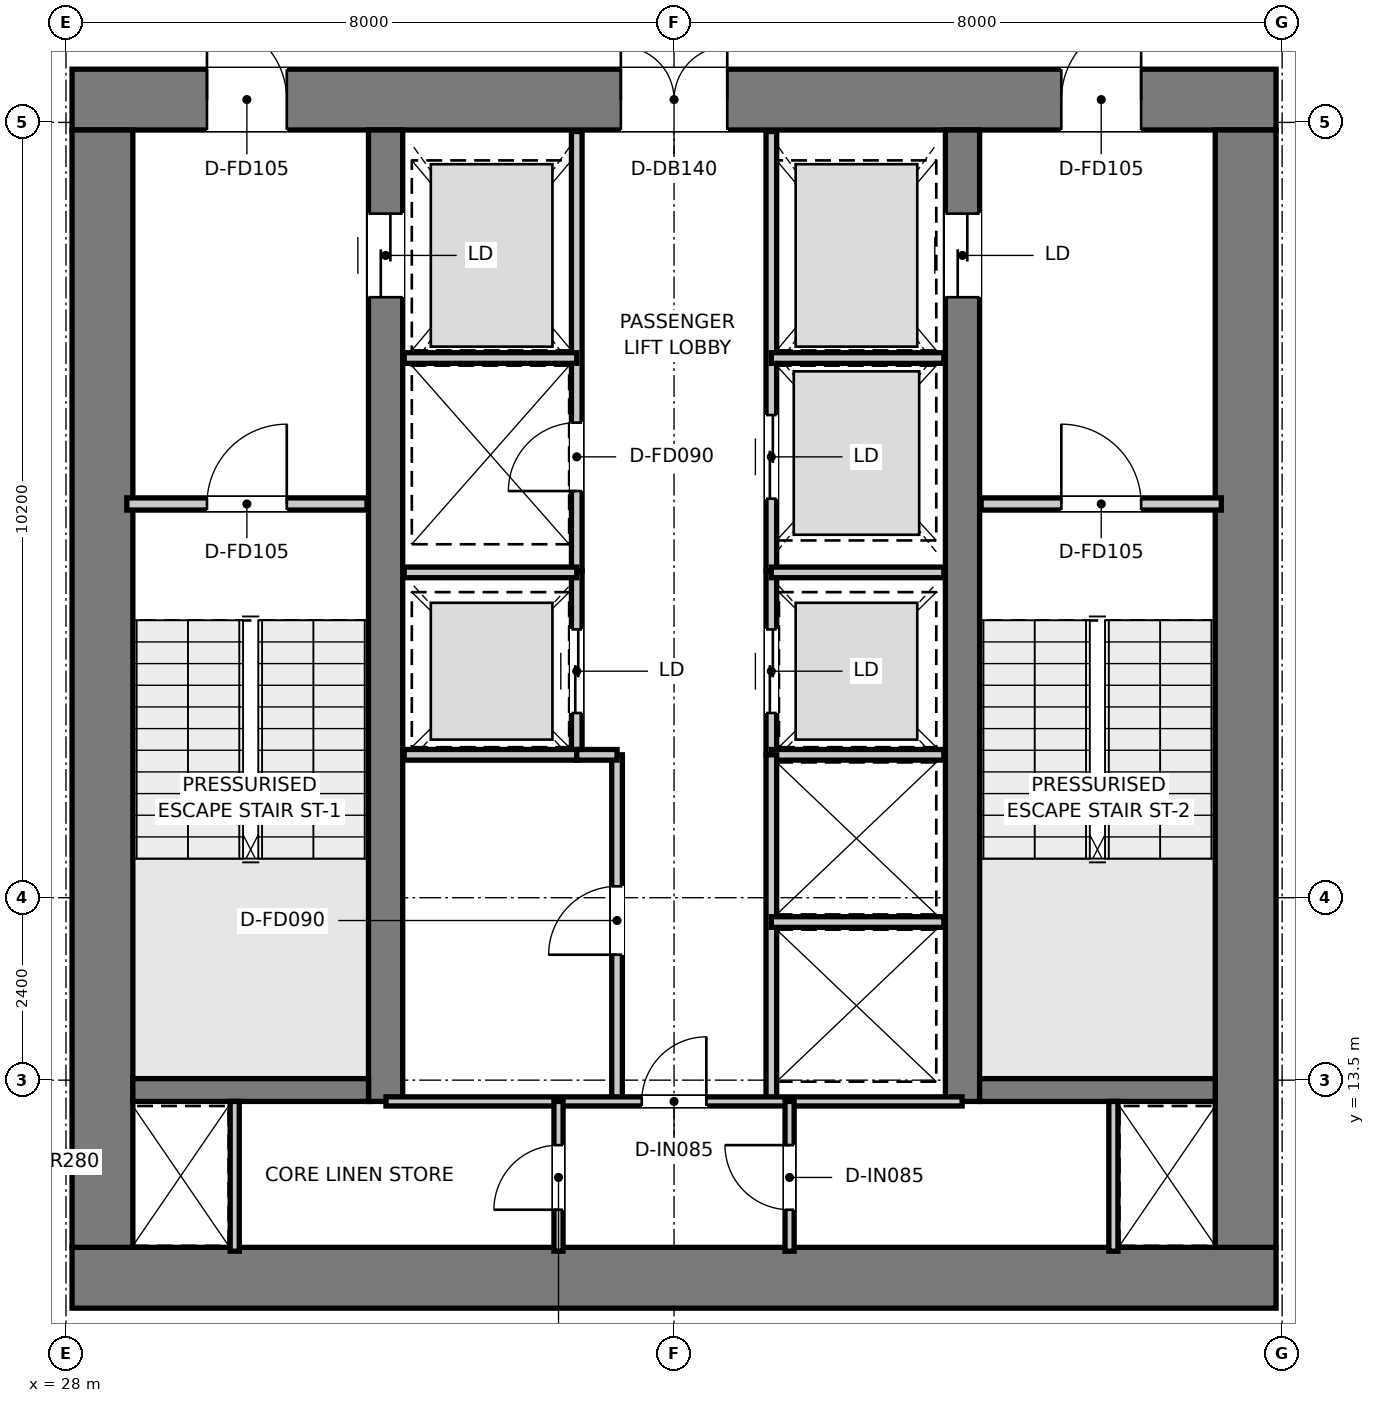
"""IFC4 building model, lengths in metres.
Left out: names, types, materials, properties, quantities, classifications, styles, units other than length and angle.
Written with IfcOpenShell. Run it as: python <this file> out.ifc"""

import sys

from ifc_helpers import new_model, si_unit, direction, frame, frame_2d, origin, place, context, subcontext, project, spatial, rectangle, extrude, element, fill, save


model = new_model("IFC4")
c1 = context("Model", 3, precision=1e-05, world=origin(), true_north=direction((0.0, 1.0)))
c2 = subcontext(c1, "Body", "Model", "MODEL_VIEW")
j1 = project(units=[si_unit("LENGTHUNIT", "METRE"), si_unit("PLANEANGLEUNIT", "RADIAN")], contexts=[c1])
p1 = place(None, origin())
s1 = spatial("IfcSite", under=j1, at=p1, CompositionType="ELEMENT")
p2 = place(p1, origin())
s2 = spatial("IfcBuilding", under=s1, at=p2, CompositionType="ELEMENT")
p3 = place(p2, frame((0.0, 0.0, 267.4)))
s3 = spatial("IfcBuildingStorey", under=s2, at=p3, CompositionType="ELEMENT", Elevation=267.4)
p4 = place(p3, frame((28.08, 10.9, 0.0), z_axis=(0.0, 0.0, 1.0), x_axis=(1.0, 0.0, 0.0)))
e1 = element("IfcWall", 1, at=p4, inside=s3, PredefinedType="SHEAR", context=c2, shape_type="SweptSolid", body=[
    extrude(rectangle(XDim=15.84, YDim=0.8, at=frame_2d((7.92, 0.0))), origin(), (0.0, 0.0, 1.0), 3.95),
])
p5 = place(p3, frame((28.08, 26.4, 0.0), z_axis=(0.0, 0.0, 1.0), x_axis=(1.0, 0.0, 0.0)))
e2 = element("IfcWall", 2, at=p5, inside=s3, PredefinedType="SHEAR", context=c2, shape_type="SweptSolid", body=[
    extrude(rectangle(XDim=15.84, YDim=0.8, at=frame_2d((7.92, 0.0))), origin(), (0.0, 0.0, 1.0), 3.95),
])
p6 = place(p5, frame((7.22, 0.0, 0.0)))
e3 = element("IfcOpeningElement", 3, at=p6, cuts=e2, PredefinedType="OPENING", context=c2, shape_type="SweptSolid", body=[
    extrude(rectangle(XDim=1.4, YDim=2.2, at=frame_2d((0.7, 1.1))), frame((0.0, 0.41, 0.0), z_axis=(0.0, -1.0, 0.0), x_axis=(1.0, 0.0, 0.0)), (0.0, 0.0, 1.0), 0.82),
])
p7 = place(p5, frame((1.775, 0.0, 0.0)))
e4 = element("IfcOpeningElement", 4, at=p7, cuts=e2, PredefinedType="OPENING", context=c2, shape_type="SweptSolid", body=[
    extrude(rectangle(XDim=1.05, YDim=2.1, at=frame_2d((0.525, 1.05))), frame((0.0, 0.41, 0.0), z_axis=(0.0, -1.0, 0.0), x_axis=(1.0, 0.0, 0.0)), (0.0, 0.0, 1.0), 0.82),
])
p8 = place(p5, frame((13.015, 0.0, 0.0)))
e5 = element("IfcOpeningElement", 5, at=p8, cuts=e2, PredefinedType="OPENING", context=c2, shape_type="SweptSolid", body=[
    extrude(rectangle(XDim=1.05, YDim=2.1, at=frame_2d((0.525, 1.05))), frame((0.0, 0.41, 0.0), z_axis=(0.0, -1.0, 0.0), x_axis=(1.0, 0.0, 0.0)), (0.0, 0.0, 1.0), 0.82),
])
for number, where, z_axis, x_axis in (
    (6, (28.48, 11.3, 0.0), (0.0, 0.0, 1.0), (0.0, 1.0, 0.0)),
    (7, (43.52, 11.3, 0.0), (0.0, 0.0, 1.0), (0.0, 1.0, 0.0)),
):
    element("IfcWall", number, at=place(p3, frame(where, z_axis=z_axis, x_axis=x_axis)), inside=s3, PredefinedType="SHEAR", context=c2, shape_type="SweptSolid", body=[
        extrude(rectangle(XDim=14.7, YDim=0.8, at=frame_2d((7.35, 0.0))), origin(), (0.0, 0.0, 1.0), 3.95),
    ])
p9 = place(p3, frame((32.205, 13.22, 0.0), z_axis=(0.0, 0.0, 1.0), x_axis=(0.0, 1.0, 0.0)))
e8 = element("IfcWall", 8, at=p9, inside=s3, PredefinedType="SHEAR", context=c2, shape_type="SweptSolid", body=[
    extrude(rectangle(XDim=12.78, YDim=0.45, at=frame_2d((6.39, 0.0))), origin(), (0.0, 0.0, 1.0), 3.95),
])
p10 = place(p9, frame((10.58, 0.0, 0.0)))
e9 = element("IfcOpeningElement", 9, at=p10, cuts=e8, PredefinedType="OPENING", context=c2, shape_type="SweptSolid", body=[
    extrude(rectangle(XDim=1.1, YDim=2.15, at=frame_2d((0.55, 1.075))), frame((0.0, 0.235, 0.0), z_axis=(0.0, -1.0, 0.0), x_axis=(1.0, 0.0, 0.0)), (0.0, 0.0, 1.0), 0.47),
])
p11 = place(p3, frame((39.795, 13.22, 0.0), z_axis=(0.0, 0.0, 1.0), x_axis=(0.0, 1.0, 0.0)))
e10 = element("IfcWall", 10, at=p11, inside=s3, PredefinedType="SHEAR", context=c2, shape_type="SweptSolid", body=[
    extrude(rectangle(XDim=12.78, YDim=0.45, at=frame_2d((6.39, 0.0))), origin(), (0.0, 0.0, 1.0), 3.95),
])
p12 = place(p11, frame((10.58, 0.0, 0.0)))
e11 = element("IfcOpeningElement", 11, at=p12, cuts=e10, PredefinedType="OPENING", context=c2, shape_type="SweptSolid", body=[
    extrude(rectangle(XDim=1.1, YDim=2.15, at=frame_2d((0.55, 1.075))), frame((0.0, 0.235, 0.0), z_axis=(0.0, -1.0, 0.0), x_axis=(1.0, 0.0, 0.0)), (0.0, 0.0, 1.0), 0.47),
])
for number, where, z_axis, x_axis in (
    (12, (28.88, 13.37, 0.0), (0.0, 0.0, 1.0), (1.0, 0.0, 0.0)),
    (13, (40.02, 13.37, 0.0), (0.0, 0.0, 1.0), (1.0, 0.0, 0.0)),
):
    element("IfcWall", number, at=place(p3, frame(where, z_axis=z_axis, x_axis=x_axis)), inside=s3, PredefinedType="SHEAR", context=c2, shape_type="SweptSolid", body=[
        extrude(rectangle(XDim=3.1, YDim=0.3, at=frame_2d((1.55, 0.0))), origin(), (0.0, 0.0, 1.0), 3.95),
    ])
p13 = place(p3, frame((28.8, 21.08, 0.0), z_axis=(0.0, 0.0, 1.0), x_axis=(1.0, 0.0, 0.0)))
e14 = element("IfcWall", 14, at=p13, inside=s3, PredefinedType="PARTITIONING", context=c2, shape_type="SweptSolid", body=[
    extrude(rectangle(XDim=3.16, YDim=0.16, at=frame_2d((1.58, 0.0))), origin(), (0.0, 0.0, 1.0), 3.67),
])
p14 = place(p13, frame((1.055, 0.0, 0.0)))
e15 = element("IfcOpeningElement", 15, at=p14, cuts=e14, PredefinedType="OPENING", context=c2, shape_type="SweptSolid", body=[
    extrude(rectangle(XDim=1.05, YDim=2.1, at=frame_2d((0.525, 1.05))), frame((0.0, 0.09, 0.0), z_axis=(0.0, -1.0, 0.0), x_axis=(1.0, 0.0, 0.0)), (0.0, 0.0, 1.0), 0.18),
])
p15 = place(p3, frame((40.04, 21.08, 0.0), z_axis=(0.0, 0.0, 1.0), x_axis=(1.0, 0.0, 0.0)))
e16 = element("IfcWall", 16, at=p15, inside=s3, PredefinedType="PARTITIONING", context=c2, shape_type="SweptSolid", body=[
    extrude(rectangle(XDim=3.16, YDim=0.16, at=frame_2d((1.58, 0.0))), origin(), (0.0, 0.0, 1.0), 3.67),
])
p16 = place(p15, frame((1.055, 0.0, 0.0)))
e17 = element("IfcOpeningElement", 17, at=p16, cuts=e16, PredefinedType="OPENING", context=c2, shape_type="SweptSolid", body=[
    extrude(rectangle(XDim=1.05, YDim=2.1, at=frame_2d((0.525, 1.05))), frame((0.0, 0.09, 0.0), z_axis=(0.0, -1.0, 0.0), x_axis=(1.0, 0.0, 0.0)), (0.0, 0.0, 1.0), 0.18),
])
p17 = place(p3, frame((34.72, 20.2, 0.0), z_axis=(0.0, 0.0, 1.0), x_axis=(0.0, 1.0, 0.0)))
e18 = element("IfcWall", 18, at=p17, inside=s3, PredefinedType="PARTITIONING", context=c2, shape_type="SweptSolid", body=[
    extrude(rectangle(XDim=5.78, YDim=0.14, at=frame_2d((2.89, 0.0))), origin(), (0.0, 0.0, 1.0), 2.82),
])
p18 = place(p17, frame((1.05, 0.0, 0.0)))
e19 = element("IfcOpeningElement", 19, at=p18, cuts=e18, PredefinedType="OPENING", context=c2, shape_type="SweptSolid", body=[
    extrude(rectangle(XDim=0.9, YDim=2.1, at=frame_2d((0.45, 1.05))), frame((0.0, 0.08, 0.0), z_axis=(0.0, -1.0, 0.0), x_axis=(1.0, 0.0, 0.0)), (0.0, 0.0, 1.0), 0.16),
])
p19 = place(p3, frame((37.28, 20.2, 0.0), z_axis=(0.0, 0.0, 1.0), x_axis=(0.0, 1.0, 0.0)))
e20 = element("IfcWall", 20, at=p19, inside=s3, PredefinedType="PARTITIONING", context=c2, shape_type="SweptSolid", body=[
    extrude(rectangle(XDim=5.78, YDim=0.14, at=frame_2d((2.89, 0.0))), origin(), (0.0, 0.0, 1.0), 2.82),
])
p20 = place(p19, frame((0.95, 0.0, 0.0)))
e21 = element("IfcOpeningElement", 21, at=p20, cuts=e20, PredefinedType="OPENING", context=c2, shape_type="SweptSolid", body=[
    extrude(rectangle(XDim=1.1, YDim=2.15, at=frame_2d((0.55, 1.075))), frame((0.0, 0.08, 0.0), z_axis=(0.0, -1.0, 0.0), x_axis=(1.0, 0.0, 0.0)), (0.0, 0.0, 1.0), 0.16),
])
for number, where, z_axis, x_axis in (
    (22, (32.45, 23.0, 0.0), (0.0, 0.0, 1.0), (1.0, 0.0, 0.0)),
    (23, (37.28, 23.0, 0.0), (0.0, 0.0, 1.0), (1.0, 0.0, 0.0)),
):
    element("IfcWall", number, at=place(p3, frame(where, z_axis=z_axis, x_axis=x_axis)), inside=s3, PredefinedType="PARTITIONING", context=c2, shape_type="SweptSolid", body=[
        extrude(rectangle(XDim=2.27, YDim=0.14, at=frame_2d((1.135, 0.0))), origin(), (0.0, 0.0, 1.0), 2.82),
    ])
p21 = place(p3, frame((34.72, 17.78, 0.0), z_axis=(0.0, 0.0, 1.0), x_axis=(0.0, 1.0, 0.0)))
e24 = element("IfcWall", 24, at=p21, inside=s3, PredefinedType="PARTITIONING", context=c2, shape_type="SweptSolid", body=[
    extrude(rectangle(XDim=2.42, YDim=0.14, at=frame_2d((1.21, 0.0))), origin(), (0.0, 0.0, 1.0), 3.67),
])
p22 = place(p21, frame((0.55, 0.0, 0.0)))
e25 = element("IfcOpeningElement", 25, at=p22, cuts=e24, PredefinedType="OPENING", context=c2, shape_type="SweptSolid", body=[
    extrude(rectangle(XDim=1.1, YDim=2.15, at=frame_2d((0.55, 1.075))), frame((0.0, 0.08, 0.0), z_axis=(0.0, -1.0, 0.0), x_axis=(1.0, 0.0, 0.0)), (0.0, 0.0, 1.0), 0.16),
])
p23 = place(p3, frame((37.28, 17.78, 0.0), z_axis=(0.0, 0.0, 1.0), x_axis=(0.0, 1.0, 0.0)))
e26 = element("IfcWall", 26, at=p23, inside=s3, PredefinedType="PARTITIONING", context=c2, shape_type="SweptSolid", body=[
    extrude(rectangle(XDim=2.42, YDim=0.14, at=frame_2d((1.21, 0.0))), origin(), (0.0, 0.0, 1.0), 3.67),
])
p24 = place(p23, frame((0.55, 0.0, 0.0)))
e27 = element("IfcOpeningElement", 27, at=p24, cuts=e26, PredefinedType="OPENING", context=c2, shape_type="SweptSolid", body=[
    extrude(rectangle(XDim=1.1, YDim=2.15, at=frame_2d((0.55, 1.075))), frame((0.0, 0.08, 0.0), z_axis=(0.0, -1.0, 0.0), x_axis=(1.0, 0.0, 0.0)), (0.0, 0.0, 1.0), 0.16),
])
for number, where, z_axis, x_axis in (
    (28, (32.45, 17.78, 0.0), (0.0, 0.0, 1.0), (1.0, 0.0, 0.0)),
    (29, (32.45, 20.18, 0.0), (0.0, 0.0, 1.0), (1.0, 0.0, 0.0)),
    (30, (37.28, 17.78, 0.0), (0.0, 0.0, 1.0), (1.0, 0.0, 0.0)),
    (31, (37.28, 20.18, 0.0), (0.0, 0.0, 1.0), (1.0, 0.0, 0.0)),
):
    element("IfcWall", number, at=place(p3, frame(where, z_axis=z_axis, x_axis=x_axis)), inside=s3, PredefinedType="PARTITIONING", context=c2, shape_type="SweptSolid", body=[
        extrude(rectangle(XDim=2.27, YDim=0.14, at=frame_2d((1.135, 0.0))), origin(), (0.0, 0.0, 1.0), 3.67),
    ])
p25 = place(p3, frame((35.25, 13.22, 0.0), z_axis=(0.0, 0.0, 1.0), x_axis=(0.0, 1.0, 0.0)))
e32 = element("IfcWall", 32, at=p25, inside=s3, PredefinedType="PARTITIONING", context=c2, shape_type="SweptSolid", body=[
    extrude(rectangle(XDim=4.56, YDim=0.14, at=frame_2d((2.28, 0.0))), origin(), (0.0, 0.0, 1.0), 3.67),
])
p26 = place(p25, frame((1.93, 0.0, 0.0)))
e33 = element("IfcOpeningElement", 33, at=p26, cuts=e32, PredefinedType="OPENING", context=c2, shape_type="SweptSolid", body=[
    extrude(rectangle(XDim=0.9, YDim=2.1, at=frame_2d((0.45, 1.05))), frame((0.0, 0.08, 0.0), z_axis=(0.0, -1.0, 0.0), x_axis=(1.0, 0.0, 0.0)), (0.0, 0.0, 1.0), 0.16),
])
p27 = place(p3, frame((34.72, 17.78, 0.0), z_axis=(0.0, 0.0, 1.0), x_axis=(1.0, 0.0, 0.0)))
e34 = element("IfcWall", 34, at=p27, inside=s3, PredefinedType="PARTITIONING", context=c2, shape_type="SweptSolid", body=[
    extrude(rectangle(XDim=0.53, YDim=0.14, at=frame_2d((0.265, 0.0))), origin(), (0.0, 0.0, 1.0), 3.67),
])
p28 = place(p3, frame((37.28, 13.22, 0.0), z_axis=(0.0, 0.0, 1.0), x_axis=(0.0, 1.0, 0.0)))
e35 = element("IfcWall", 35, at=p28, inside=s3, PredefinedType="PARTITIONING", context=c2, shape_type="SweptSolid", body=[
    extrude(rectangle(XDim=4.56, YDim=0.14, at=frame_2d((2.28, 0.0))), origin(), (0.0, 0.0, 1.0), 3.67),
])
p29 = place(p3, frame((37.28, 15.58, 0.0), z_axis=(0.0, 0.0, 1.0), x_axis=(1.0, 0.0, 0.0)))
e36 = element("IfcWall", 36, at=p29, inside=s3, PredefinedType="PARTITIONING", context=c2, shape_type="SweptSolid", body=[
    extrude(rectangle(XDim=2.27, YDim=0.14, at=frame_2d((1.135, 0.0))), origin(), (0.0, 0.0, 1.0), 3.67),
])
for number, where, z_axis, x_axis in (
    (37, (30.22, 11.25, 0.0), (0.0, 0.0, 1.0), (0.0, 1.0, 0.0)),
    (38, (41.78, 11.25, 0.0), (0.0, 0.0, 1.0), (0.0, 1.0, 0.0)),
):
    element("IfcWall", number, at=place(p3, frame(where, z_axis=z_axis, x_axis=x_axis)), inside=s3, PredefinedType="PARTITIONING", context=c2, shape_type="SweptSolid", body=[
        extrude(rectangle(XDim=1.97, YDim=0.12, at=frame_2d((0.985, 0.0))), origin(), (0.0, 0.0, 1.0), 3.67),
    ])
p30 = place(p3, frame((32.21, 13.22, 0.0), z_axis=(0.0, 0.0, 1.0), x_axis=(1.0, 0.0, 0.0)))
e39 = element("IfcWall", 39, at=p30, inside=s3, PredefinedType="PARTITIONING", context=c2, shape_type="SweptSolid", body=[
    extrude(rectangle(XDim=7.58, YDim=0.12, at=frame_2d((3.79, 0.0))), origin(), (0.0, 0.0, 1.0), 3.67),
])
p31 = place(p30, frame((3.365, 0.0, 0.0)))
e40 = element("IfcOpeningElement", 40, at=p31, cuts=e39, PredefinedType="OPENING", context=c2, shape_type="SweptSolid", body=[
    extrude(rectangle(XDim=0.85, YDim=2.1, at=frame_2d((0.425, 1.05))), frame((0.0, 0.07, 0.0), z_axis=(0.0, -1.0, 0.0), x_axis=(1.0, 0.0, 0.0)), (0.0, 0.0, 1.0), 0.14),
])
p32 = place(p3, frame((34.48, 11.25, 0.0), z_axis=(0.0, 0.0, 1.0), x_axis=(0.0, 1.0, 0.0)))
e41 = element("IfcWall", 41, at=p32, inside=s3, PredefinedType="PARTITIONING", context=c2, shape_type="SweptSolid", body=[
    extrude(rectangle(XDim=1.97, YDim=0.12, at=frame_2d((0.985, 0.0))), origin(), (0.0, 0.0, 1.0), 3.67),
])
p33 = place(p32, frame((0.545, 0.0, 0.0)))
e42 = element("IfcOpeningElement", 42, at=p33, cuts=e41, PredefinedType="OPENING", context=c2, shape_type="SweptSolid", body=[
    extrude(rectangle(XDim=0.85, YDim=2.1, at=frame_2d((0.425, 1.05))), frame((0.0, 0.07, 0.0), z_axis=(0.0, -1.0, 0.0), x_axis=(1.0, 0.0, 0.0)), (0.0, 0.0, 1.0), 0.14),
])
p34 = place(p3, frame((37.52, 11.25, 0.0), z_axis=(0.0, 0.0, 1.0), x_axis=(0.0, 1.0, 0.0)))
e43 = element("IfcWall", 43, at=p34, inside=s3, PredefinedType="PARTITIONING", context=c2, shape_type="SweptSolid", body=[
    extrude(rectangle(XDim=1.97, YDim=0.12, at=frame_2d((0.985, 0.0))), origin(), (0.0, 0.0, 1.0), 3.67),
])
p35 = place(p34, frame((0.545, 0.0, 0.0)))
e44 = element("IfcOpeningElement", 44, at=p35, cuts=e43, PredefinedType="OPENING", context=c2, shape_type="SweptSolid", body=[
    extrude(rectangle(XDim=0.85, YDim=2.1, at=frame_2d((0.425, 1.05))), frame((0.0, 0.07, 0.0), z_axis=(0.0, -1.0, 0.0), x_axis=(1.0, 0.0, 0.0)), (0.0, 0.0, 1.0), 0.14),
])
p36 = place(p14, origin())
e45 = element("IfcDoor", 45, at=p36, inside=s3, OperationType="SINGLE_SWING_RIGHT", PredefinedType="DOOR", context=c2, shape_type="SweptSolid", body=[
    extrude(rectangle(XDim=1.05, YDim=2.1, at=frame_2d((0.525, 1.05))), frame((0.0, 0.025, 0.0), z_axis=(0.0, -1.0, 0.0), x_axis=(1.0, 0.0, 0.0)), (0.0, 0.0, 1.0), 0.05),
])
fill(e15, e45)
p37 = place(p16, origin())
e46 = element("IfcDoor", 46, at=p37, inside=s3, OperationType="SINGLE_SWING_LEFT", PredefinedType="DOOR", context=c2, shape_type="SweptSolid", body=[
    extrude(rectangle(XDim=1.05, YDim=2.1, at=frame_2d((0.525, 1.05))), frame((0.0, 0.025, 0.0), z_axis=(0.0, -1.0, 0.0), x_axis=(1.0, 0.0, 0.0)), (0.0, 0.0, 1.0), 0.05),
])
fill(e17, e46)
p38 = place(p6, origin())
e47 = element("IfcDoor", 47, at=p38, inside=s3, OperationType="DOUBLE_DOOR_SINGLE_SWING", PredefinedType="DOOR", context=c2, shape_type="SweptSolid", body=[
    extrude(rectangle(XDim=1.4, YDim=2.2, at=frame_2d((0.7, 1.1))), frame((0.0, 0.025, 0.0), z_axis=(0.0, -1.0, 0.0), x_axis=(1.0, 0.0, 0.0)), (0.0, 0.0, 1.0), 0.05),
])
fill(e3, e47)
p39 = place(p7, origin())
e48 = element("IfcDoor", 48, at=p39, inside=s3, OperationType="SINGLE_SWING_LEFT", PredefinedType="DOOR", context=c2, shape_type="SweptSolid", body=[
    extrude(rectangle(XDim=1.05, YDim=2.1, at=frame_2d((0.525, 1.05))), frame((0.0, 0.025, 0.0), z_axis=(0.0, -1.0, 0.0), x_axis=(1.0, 0.0, 0.0)), (0.0, 0.0, 1.0), 0.05),
])
fill(e4, e48)
p40 = place(p8, origin())
e49 = element("IfcDoor", 49, at=p40, inside=s3, OperationType="SINGLE_SWING_RIGHT", PredefinedType="DOOR", context=c2, shape_type="SweptSolid", body=[
    extrude(rectangle(XDim=1.05, YDim=2.1, at=frame_2d((0.525, 1.05))), frame((0.0, 0.025, 0.0), z_axis=(0.0, -1.0, 0.0), x_axis=(1.0, 0.0, 0.0)), (0.0, 0.0, 1.0), 0.05),
])
fill(e5, e49)
p41 = place(p10, origin())
e50 = element("IfcDoor", 50, at=p41, inside=s3, OperationType="DOUBLE_DOOR_SLIDING", PredefinedType="DOOR", context=c2, shape_type="SweptSolid", body=[
    extrude(rectangle(XDim=1.1, YDim=2.15, at=frame_2d((0.55, 1.075))), frame((0.0, 0.025, 0.0), z_axis=(0.0, -1.0, 0.0), x_axis=(1.0, 0.0, 0.0)), (0.0, 0.0, 1.0), 0.05),
])
fill(e9, e50)
p42 = place(p12, origin())
e51 = element("IfcDoor", 51, at=p42, inside=s3, OperationType="DOUBLE_DOOR_SLIDING", PredefinedType="DOOR", context=c2, shape_type="SweptSolid", body=[
    extrude(rectangle(XDim=1.1, YDim=2.15, at=frame_2d((0.55, 1.075))), frame((0.0, 0.025, 0.0), z_axis=(0.0, -1.0, 0.0), x_axis=(1.0, 0.0, 0.0)), (0.0, 0.0, 1.0), 0.05),
])
fill(e11, e51)
p43 = place(p18, origin())
e52 = element("IfcDoor", 52, at=p43, inside=s3, OperationType="SINGLE_SWING_LEFT", PredefinedType="DOOR", context=c2, shape_type="SweptSolid", body=[
    extrude(rectangle(XDim=0.9, YDim=2.1, at=frame_2d((0.45, 1.05))), frame((0.0, 0.025, 0.0), z_axis=(0.0, -1.0, 0.0), x_axis=(1.0, 0.0, 0.0)), (0.0, 0.0, 1.0), 0.05),
])
fill(e19, e52)
p44 = place(p20, origin())
e53 = element("IfcDoor", 53, at=p44, inside=s3, OperationType="DOUBLE_DOOR_SLIDING", PredefinedType="DOOR", context=c2, shape_type="SweptSolid", body=[
    extrude(rectangle(XDim=1.1, YDim=2.15, at=frame_2d((0.55, 1.075))), frame((0.0, 0.025, 0.0), z_axis=(0.0, -1.0, 0.0), x_axis=(1.0, 0.0, 0.0)), (0.0, 0.0, 1.0), 0.05),
])
fill(e21, e53)
p45 = place(p22, origin())
e54 = element("IfcDoor", 54, at=p45, inside=s3, OperationType="DOUBLE_DOOR_SLIDING", PredefinedType="DOOR", context=c2, shape_type="SweptSolid", body=[
    extrude(rectangle(XDim=1.1, YDim=2.15, at=frame_2d((0.55, 1.075))), frame((0.0, 0.025, 0.0), z_axis=(0.0, -1.0, 0.0), x_axis=(1.0, 0.0, 0.0)), (0.0, 0.0, 1.0), 0.05),
])
fill(e25, e54)
p46 = place(p24, origin())
e55 = element("IfcDoor", 55, at=p46, inside=s3, OperationType="DOUBLE_DOOR_SLIDING", PredefinedType="DOOR", context=c2, shape_type="SweptSolid", body=[
    extrude(rectangle(XDim=1.1, YDim=2.15, at=frame_2d((0.55, 1.075))), frame((0.0, 0.025, 0.0), z_axis=(0.0, -1.0, 0.0), x_axis=(1.0, 0.0, 0.0)), (0.0, 0.0, 1.0), 0.05),
])
fill(e27, e55)
p47 = place(p26, origin())
e56 = element("IfcDoor", 56, at=p47, inside=s3, OperationType="SINGLE_SWING_LEFT", PredefinedType="DOOR", context=c2, shape_type="SweptSolid", body=[
    extrude(rectangle(XDim=0.9, YDim=2.1, at=frame_2d((0.45, 1.05))), frame((0.0, 0.025, 0.0), z_axis=(0.0, -1.0, 0.0), x_axis=(1.0, 0.0, 0.0)), (0.0, 0.0, 1.0), 0.05),
])
fill(e33, e56)
p48 = place(p31, origin())
e57 = element("IfcDoor", 57, at=p48, inside=s3, OperationType="SINGLE_SWING_RIGHT", PredefinedType="DOOR", context=c2, shape_type="SweptSolid", body=[
    extrude(rectangle(XDim=0.85, YDim=2.1, at=frame_2d((0.425, 1.05))), frame((0.0, 0.025, 0.0), z_axis=(0.0, -1.0, 0.0), x_axis=(1.0, 0.0, 0.0)), (0.0, 0.0, 1.0), 0.05),
])
fill(e40, e57)
p49 = place(p33, origin())
e58 = element("IfcDoor", 58, at=p49, inside=s3, OperationType="SINGLE_SWING_LEFT", PredefinedType="DOOR", context=c2, shape_type="SweptSolid", body=[
    extrude(rectangle(XDim=0.85, YDim=2.1, at=frame_2d((0.425, 1.05))), frame((0.0, 0.025, 0.0), z_axis=(0.0, -1.0, 0.0), x_axis=(1.0, 0.0, 0.0)), (0.0, 0.0, 1.0), 0.05),
])
fill(e42, e58)
p50 = place(p35, origin())
e59 = element("IfcDoor", 59, at=p50, inside=s3, OperationType="SINGLE_SWING_RIGHT", PredefinedType="DOOR", context=c2, shape_type="SweptSolid", body=[
    extrude(rectangle(XDim=0.85, YDim=2.1, at=frame_2d((0.425, 1.05))), frame((0.0, 0.025, 0.0), z_axis=(0.0, -1.0, 0.0), x_axis=(1.0, 0.0, 0.0)), (0.0, 0.0, 1.0), 0.05),
])
fill(e44, e59)
save(model, sys.argv[1])
